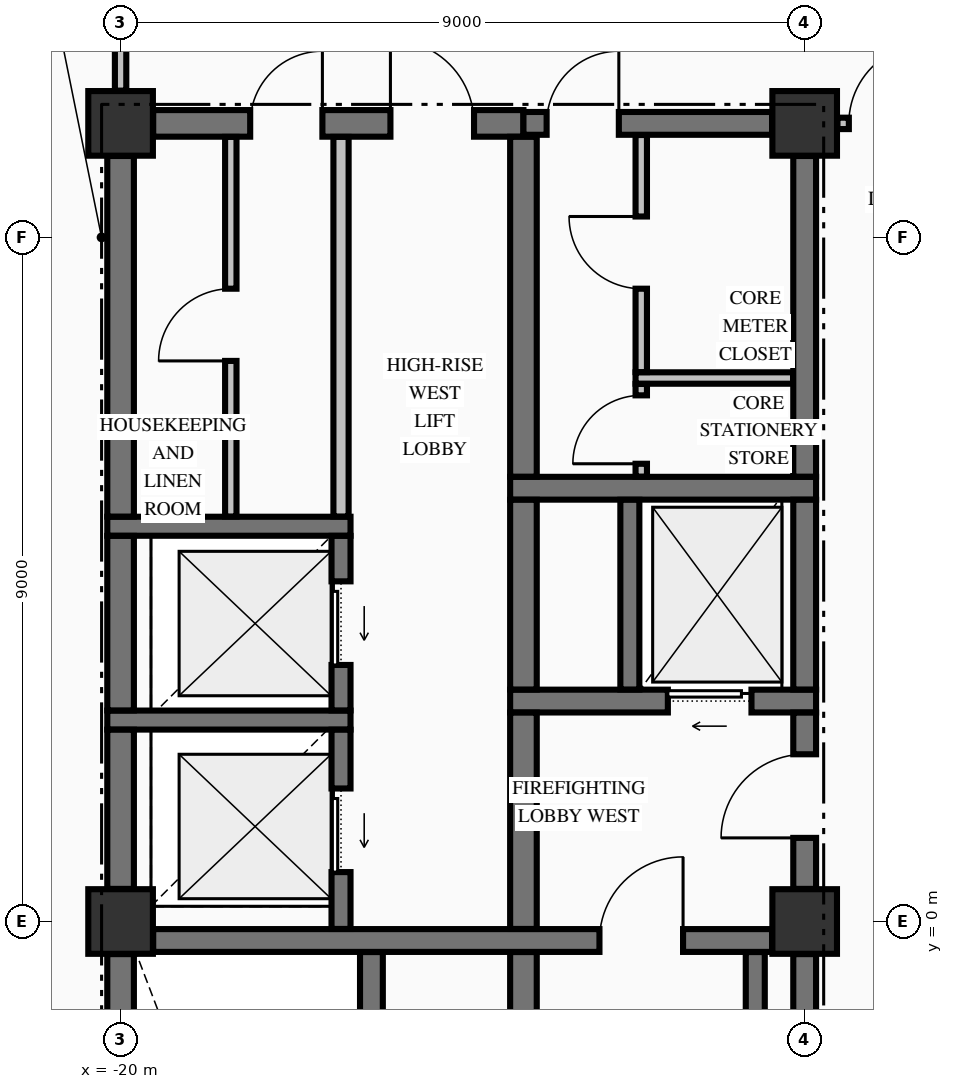
"""IFC4 building model, lengths in metres.
Left out: names, types, materials, properties, quantities, classifications, styles, units other than length and angle.
Written with IfcOpenShell. Run it as: python <this file> out.ifc"""

import sys

from ifc_helpers import new_model, si_unit, direction, frame, frame_2d, origin, origin_2d, place, context, subcontext, project, spatial, rectangle, extrude, element, fill, save


model = new_model("IFC4")
c1 = context("Model", 3, precision=1e-05, world=origin(), true_north=direction((0.0, 1.0)))
c2 = subcontext(c1, "Body", "Model", "MODEL_VIEW")
j1 = project(units=[si_unit("LENGTHUNIT", "METRE"), si_unit("PLANEANGLEUNIT", "RADIAN")], contexts=[c1])
p1 = place(None, origin())
s1 = spatial("IfcSite", under=j1, at=p1, CompositionType="ELEMENT")
p2 = place(p1, origin())
s2 = spatial("IfcBuilding", under=s1, at=p2, CompositionType="ELEMENT")
p3 = place(p2, frame((0.0, 0.0, 176.26)))
s3 = spatial("IfcBuildingStorey", under=s2, at=p3, CompositionType="ELEMENT", Elevation=176.26)
for number, where, z_axis, x_axis in (
    (1, (-20.0, 10.5, -0.275), (0.0, 0.0, 1.0), (1.0, 0.0, 0.0)),
    (2, (-11.0, 0.0, -0.275), (0.0, 0.0, 1.0), (1.0, 0.0, 0.0)),
    (3, (-11.0, 10.5, -0.275), (0.0, 0.0, 1.0), (1.0, 0.0, 0.0)),
    (4, (-20.0, 0.0, -0.275), (0.0, 0.0, 1.0), (1.0, 0.0, 0.0)),
):
    element("IfcColumn", number, at=place(p3, frame(where, z_axis=z_axis, x_axis=x_axis)), inside=s3, PredefinedType="COLUMN", context=c2, shape_type="SweptSolid", body=[
        extrude(rectangle(XDim=0.85, YDim=0.85, at=origin_2d()), origin(), (0.0, 0.0, 1.0), 3.425),
    ])
p4 = place(p3, frame((-19.571, -0.25, 0.0), z_axis=(0.0, 0.0, 1.0), x_axis=(1.0, 0.0, 0.0)))
e5 = element("IfcWall", 5, at=p4, inside=s3, PredefinedType="SHEAR", context=c2, shape_type="SweptSolid", body=[
    extrude(rectangle(XDim=8.142, YDim=0.3, at=frame_2d((4.071, 0.0))), origin(), (0.0, 0.0, 1.0), 3.15),
])
p5 = place(p4, frame((5.871, 0.0, 0.0)))
e6 = element("IfcOpeningElement", 6, at=p5, cuts=e5, PredefinedType="OPENING", context=c2, shape_type="SweptSolid", body=[
    extrude(rectangle(XDim=1.1, YDim=2.15, at=frame_2d((0.55, 1.075))), frame((0.0, 0.16, 0.0), z_axis=(0.0, -1.0, 0.0), x_axis=(1.0, 0.0, 0.0)), (0.0, 0.0, 1.0), 0.32),
])
p6 = place(p3, frame((-20.175, 2.65, 0.0), z_axis=(0.0, 0.0, 1.0), x_axis=(1.0, 0.0, 0.0)))
e7 = element("IfcWall", 7, at=p6, inside=s3, PredefinedType="SOLIDWALL", context=c2, shape_type="SweptSolid", body=[
    extrude(rectangle(XDim=3.2, YDim=0.25, at=frame_2d((1.6, 0.0))), origin(), (0.0, 0.0, 1.0), 3.15),
])
p7 = place(p3, frame((-14.875, 2.9, 0.0), z_axis=(0.0, 0.0, 1.0), x_axis=(1.0, 0.0, 0.0)))
e8 = element("IfcWall", 8, at=p7, inside=s3, PredefinedType="SHEAR", context=c2, shape_type="SweptSolid", body=[
    extrude(rectangle(XDim=4.025, YDim=0.3, at=frame_2d((2.012, 0.0))), origin(), (0.0, 0.0, 1.0), 3.15),
])
p8 = place(p7, frame((2.075, 0.0, 0.0)))
e9 = element("IfcOpeningElement", 9, at=p8, cuts=e8, PredefinedType="OPENING", context=c2, shape_type="SweptSolid", body=[
    extrude(rectangle(XDim=1.1, YDim=2.2, at=frame_2d((0.55, 1.1))), frame((0.0, 0.16, 0.0), z_axis=(0.0, -1.0, 0.0), x_axis=(1.0, 0.0, 0.0)), (0.0, 0.0, 1.0), 0.32),
])
p9 = place(p3, frame((-20.175, 5.2, 0.0), z_axis=(0.0, 0.0, 1.0), x_axis=(1.0, 0.0, 0.0)))
e10 = element("IfcWall", 10, at=p9, inside=s3, PredefinedType="SOLIDWALL", context=c2, shape_type="SweptSolid", body=[
    extrude(rectangle(XDim=3.2, YDim=0.25, at=frame_2d((1.6, 0.0))), origin(), (0.0, 0.0, 1.0), 3.15),
])
p10 = place(p3, frame((-14.875, 5.7, 0.0), z_axis=(0.0, 0.0, 1.0), x_axis=(1.0, 0.0, 0.0)))
e11 = element("IfcWall", 11, at=p10, inside=s3, PredefinedType="SHEAR", context=c2, shape_type="SweptSolid", body=[
    extrude(rectangle(XDim=4.025, YDim=0.3, at=frame_2d((2.012, 0.0))), origin(), (0.0, 0.0, 1.0), 3.15),
])
p11 = place(p3, frame((-19.571, 10.5, 0.0), z_axis=(0.0, 0.0, 1.0), x_axis=(1.0, 0.0, 0.0)))
e12 = element("IfcWall", 12, at=p11, inside=s3, PredefinedType="SHEAR", context=c2, shape_type="SweptSolid", body=[
    extrude(rectangle(XDim=4.871, YDim=0.35, at=frame_2d((2.436, 0.0))), origin(), (0.0, 0.0, 1.0), 3.15),
])
p12 = place(p11, frame((3.121, 0.0, 0.0)))
e13 = element("IfcOpeningElement", 13, at=p12, cuts=e12, PredefinedType="OPENING", context=c2, shape_type="SweptSolid", body=[
    extrude(rectangle(XDim=1.1, YDim=2.15, at=frame_2d((0.55, 1.075))), frame((0.0, 0.185, 0.0), z_axis=(0.0, -1.0, 0.0), x_axis=(1.0, 0.0, 0.0)), (0.0, 0.0, 1.0), 0.37),
])
p13 = place(p11, frame((1.276, 0.0, 0.0)))
e14 = element("IfcOpeningElement", 14, at=p13, cuts=e12, PredefinedType="OPENING", context=c2, shape_type="SweptSolid", body=[
    extrude(rectangle(XDim=0.95, YDim=2.15, at=frame_2d((0.475, 1.075))), frame((0.0, 0.185, 0.0), z_axis=(0.0, -1.0, 0.0), x_axis=(1.0, 0.0, 0.0)), (0.0, 0.0, 1.0), 0.37),
])
p14 = place(p3, frame((-14.7, 10.5, 0.0), z_axis=(0.0, 0.0, 1.0), x_axis=(1.0, 0.0, 0.0)))
e15 = element("IfcWall", 15, at=p14, inside=s3, PredefinedType="SHEAR", context=c2, shape_type="SweptSolid", body=[
    extrude(rectangle(XDim=3.271, YDim=0.3, at=frame_2d((1.635, 0.0))), origin(), (0.0, 0.0, 1.0), 3.15),
])
p15 = place(p14, frame((0.305, 0.0, 0.0)))
e16 = element("IfcOpeningElement", 16, at=p15, cuts=e15, PredefinedType="OPENING", context=c2, shape_type="SweptSolid", body=[
    extrude(rectangle(XDim=0.95, YDim=2.15, at=frame_2d((0.475, 1.075))), frame((0.0, 0.16, 0.0), z_axis=(0.0, -1.0, 0.0), x_axis=(1.0, 0.0, 0.0)), (0.0, 0.0, 1.0), 0.32),
])
p16 = place(p3, frame((-13.225, 7.15, 0.0), z_axis=(0.0, 0.0, 1.0), x_axis=(1.0, 0.0, 0.0)))
e17 = element("IfcWall", 17, at=p16, inside=s3, PredefinedType="PARTITIONING", context=c2, shape_type="SweptSolid", body=[
    extrude(rectangle(XDim=2.072, YDim=0.15, at=frame_2d((1.036, 0.0))), origin(), (0.0, 0.0, 1.0), 3.15),
])
p17 = place(p3, frame((-10.569, 10.5, 0.0), z_axis=(0.0, 0.0, 1.0), x_axis=(1.0, 0.0, 0.0)))
e18 = element("IfcWall", 18, at=p17, inside=s3, PredefinedType="PARTITIONING", context=c2, shape_type="SweptSolid", body=[
    extrude(rectangle(XDim=21.138, YDim=0.15, at=frame_2d((10.569, 0.0))), origin(), (0.0, 0.0, 1.0), 3.15),
])
p18 = place(p17, frame((0.15, 0.0, 0.0)))
e19 = element("IfcOpeningElement", 19, at=p18, cuts=e18, PredefinedType="OPENING", context=c2, shape_type="SweptSolid", body=[
    extrude(rectangle(XDim=1.05, YDim=2.15, at=frame_2d((0.525, 1.075))), frame((0.0, 0.085, 0.0), z_axis=(0.0, -1.0, 0.0), x_axis=(1.0, 0.0, 0.0)), (0.0, 0.0, 1.0), 0.17),
])
p19 = place(p17, frame((19.938, 0.0, 0.0)))
e20 = element("IfcOpeningElement", 20, at=p19, cuts=e18, PredefinedType="OPENING", context=c2, shape_type="SweptSolid", body=[
    extrude(rectangle(XDim=1.05, YDim=2.15, at=frame_2d((0.525, 1.075))), frame((0.0, 0.085, 0.0), z_axis=(0.0, -1.0, 0.0), x_axis=(1.0, 0.0, 0.0)), (0.0, 0.0, 1.0), 0.17),
])
p20 = place(p3, frame((-20.0, -9.521, 0.0), z_axis=(0.0, 0.0, 1.0), x_axis=(0.0, 1.0, 0.0)))
e21 = element("IfcWall", 21, at=p20, inside=s3, PredefinedType="SHEAR", context=c2, shape_type="SweptSolid", body=[
    extrude(rectangle(XDim=9.092, YDim=0.35, at=frame_2d((4.546, 0.0))), origin(), (0.0, 0.0, 1.0), 3.15),
])
p21 = place(p3, frame((-20.0, 0.429, 0.0), z_axis=(0.0, 0.0, 1.0), x_axis=(0.0, 1.0, 0.0)))
e22 = element("IfcWall", 22, at=p21, inside=s3, PredefinedType="SHEAR", context=c2, shape_type="SweptSolid", body=[
    extrude(rectangle(XDim=2.094, YDim=0.35, at=frame_2d((1.047, 0.0))), origin(), (0.0, 0.0, 1.0), 3.15),
])
p22 = place(p3, frame((-20.0, 2.777, 0.0), z_axis=(0.0, 0.0, 1.0), x_axis=(0.0, 1.0, 0.0)))
e23 = element("IfcWall", 23, at=p22, inside=s3, PredefinedType="SHEAR", context=c2, shape_type="SweptSolid", body=[
    extrude(rectangle(XDim=2.296, YDim=0.35, at=frame_2d((1.148, 0.0))), origin(), (0.0, 0.0, 1.0), 3.15),
])
p23 = place(p3, frame((-20.0, 5.327, 0.0), z_axis=(0.0, 0.0, 1.0), x_axis=(0.0, 1.0, 0.0)))
e24 = element("IfcWall", 24, at=p23, inside=s3, PredefinedType="SHEAR", context=c2, shape_type="SweptSolid", body=[
    extrude(rectangle(XDim=4.744, YDim=0.35, at=frame_2d((2.372, 0.0))), origin(), (0.0, 0.0, 1.0), 3.15),
])
p24 = place(p3, frame((-17.1, -0.098, 0.0), z_axis=(0.0, 0.0, 1.0), x_axis=(0.0, 1.0, 0.0)))
e25 = element("IfcWall", 25, at=p24, inside=s3, PredefinedType="SOLIDWALL", context=c2, shape_type="SweptSolid", body=[
    extrude(rectangle(XDim=2.621, YDim=0.25, at=frame_2d((1.311, 0.0))), origin(), (0.0, 0.0, 1.0), 3.15),
])
p25 = place(p24, frame((0.748, 0.0, 0.0)))
e26 = element("IfcOpeningElement", 26, at=p25, cuts=e25, PredefinedType="OPENING", context=c2, shape_type="SweptSolid", body=[
    extrude(rectangle(XDim=1.1, YDim=2.2, at=frame_2d((0.55, 1.1))), frame((0.0, 0.135, 0.0), z_axis=(0.0, -1.0, 0.0), x_axis=(1.0, 0.0, 0.0)), (0.0, 0.0, 1.0), 0.27),
])
p26 = place(p3, frame((-17.1, 2.777, 0.0), z_axis=(0.0, 0.0, 1.0), x_axis=(0.0, 1.0, 0.0)))
e27 = element("IfcWall", 27, at=p26, inside=s3, PredefinedType="SOLIDWALL", context=c2, shape_type="SweptSolid", body=[
    extrude(rectangle(XDim=2.296, YDim=0.25, at=frame_2d((1.148, 0.0))), origin(), (0.0, 0.0, 1.0), 3.15),
])
p27 = place(p26, frame((0.598, 0.0, 0.0)))
e28 = element("IfcOpeningElement", 28, at=p27, cuts=e27, PredefinedType="OPENING", context=c2, shape_type="SweptSolid", body=[
    extrude(rectangle(XDim=1.1, YDim=2.2, at=frame_2d((0.55, 1.1))), frame((0.0, 0.135, 0.0), z_axis=(0.0, -1.0, 0.0), x_axis=(1.0, 0.0, 0.0)), (0.0, 0.0, 1.0), 0.27),
])
p28 = place(p3, frame((-16.7, -9.773, 0.0), z_axis=(0.0, 0.0, 1.0), x_axis=(0.0, 1.0, 0.0)))
e29 = element("IfcWall", 29, at=p28, inside=s3, PredefinedType="SHEAR", context=c2, shape_type="SweptSolid", body=[
    extrude(rectangle(XDim=9.371, YDim=0.3, at=frame_2d((4.686, 0.0))), origin(), (0.0, 0.0, 1.0), 3.15),
])
p29 = place(p3, frame((-14.7, -9.773, 0.0), z_axis=(0.0, 0.0, 1.0), x_axis=(0.0, 1.0, 0.0)))
e30 = element("IfcWall", 30, at=p29, inside=s3, PredefinedType="SHEAR", context=c2, shape_type="SweptSolid", body=[
    extrude(rectangle(XDim=9.371, YDim=0.35, at=frame_2d((4.686, 0.0))), origin(), (0.0, 0.0, 1.0), 3.15),
])
p30 = place(p3, frame((-14.7, -0.098, 0.0), z_axis=(0.0, 0.0, 1.0), x_axis=(0.0, 1.0, 0.0)))
e31 = element("IfcWall", 31, at=p30, inside=s3, PredefinedType="SHEAR", context=c2, shape_type="SweptSolid", body=[
    extrude(rectangle(XDim=2.846, YDim=0.35, at=frame_2d((1.423, 0.0))), origin(), (0.0, 0.0, 1.0), 3.15),
])
p31 = place(p3, frame((-14.7, 3.052, 0.0), z_axis=(0.0, 0.0, 1.0), x_axis=(0.0, 1.0, 0.0)))
e32 = element("IfcWall", 32, at=p31, inside=s3, PredefinedType="SHEAR", context=c2, shape_type="SweptSolid", body=[
    extrude(rectangle(XDim=2.496, YDim=0.35, at=frame_2d((1.248, 0.0))), origin(), (0.0, 0.0, 1.0), 3.15),
])
p32 = place(p3, frame((-14.7, 5.852, 0.0), z_axis=(0.0, 0.0, 1.0), x_axis=(0.0, 1.0, 0.0)))
e33 = element("IfcWall", 33, at=p32, inside=s3, PredefinedType="SHEAR", context=c2, shape_type="SweptSolid", body=[
    extrude(rectangle(XDim=4.471, YDim=0.35, at=frame_2d((2.235, 0.0))), origin(), (0.0, 0.0, 1.0), 3.15),
])
p33 = place(p3, frame((-13.3, 3.052, 0.0), z_axis=(0.0, 0.0, 1.0), x_axis=(0.0, 1.0, 0.0)))
e34 = element("IfcWall", 34, at=p33, inside=s3, PredefinedType="SOLIDWALL", context=c2, shape_type="SweptSolid", body=[
    extrude(rectangle(XDim=2.496, YDim=0.25, at=frame_2d((1.248, 0.0))), origin(), (0.0, 0.0, 1.0), 3.15),
])
p34 = place(p3, frame((-11.65, -9.798, 0.0), z_axis=(0.0, 0.0, 1.0), x_axis=(0.0, 1.0, 0.0)))
e35 = element("IfcWall", 35, at=p34, inside=s3, PredefinedType="SOLIDWALL", context=c2, shape_type="SweptSolid", body=[
    extrude(rectangle(XDim=9.396, YDim=0.25, at=frame_2d((4.698, 0.0))), origin(), (0.0, 0.0, 1.0), 3.15),
])
p35 = place(p3, frame((-11.0, -9.521, 0.0), z_axis=(0.0, 0.0, 1.0), x_axis=(0.0, 1.0, 0.0)))
e36 = element("IfcWall", 36, at=p35, inside=s3, PredefinedType="SHEAR", context=c2, shape_type="SweptSolid", body=[
    extrude(rectangle(XDim=9.092, YDim=0.3, at=frame_2d((4.546, 0.0))), origin(), (0.0, 0.0, 1.0), 3.15),
])
p36 = place(p3, frame((-11.0, 0.429, 0.0), z_axis=(0.0, 0.0, 1.0), x_axis=(0.0, 1.0, 0.0)))
e37 = element("IfcWall", 37, at=p36, inside=s3, PredefinedType="SHEAR", context=c2, shape_type="SweptSolid", body=[
    extrude(rectangle(XDim=2.319, YDim=0.3, at=frame_2d((1.16, 0.0))), origin(), (0.0, 0.0, 1.0), 3.15),
])
p37 = place(p36, frame((0.671, 0.0, 0.0)))
e38 = element("IfcOpeningElement", 38, at=p37, cuts=e37, PredefinedType="OPENING", context=c2, shape_type="SweptSolid", body=[
    extrude(rectangle(XDim=1.1, YDim=2.15, at=frame_2d((0.55, 1.075))), frame((0.0, 0.16, 0.0), z_axis=(0.0, -1.0, 0.0), x_axis=(1.0, 0.0, 0.0)), (0.0, 0.0, 1.0), 0.32),
])
p38 = place(p3, frame((-11.0, 3.052, 0.0), z_axis=(0.0, 0.0, 1.0), x_axis=(0.0, 1.0, 0.0)))
e39 = element("IfcWall", 39, at=p38, inside=s3, PredefinedType="SHEAR", context=c2, shape_type="SweptSolid", body=[
    extrude(rectangle(XDim=2.496, YDim=0.3, at=frame_2d((1.248, 0.0))), origin(), (0.0, 0.0, 1.0), 3.15),
])
p39 = place(p3, frame((-11.0, 5.852, 0.0), z_axis=(0.0, 0.0, 1.0), x_axis=(0.0, 1.0, 0.0)))
e40 = element("IfcWall", 40, at=p39, inside=s3, PredefinedType="SHEAR", context=c2, shape_type="SweptSolid", body=[
    extrude(rectangle(XDim=4.219, YDim=0.3, at=frame_2d((2.109, 0.0))), origin(), (0.0, 0.0, 1.0), 3.15),
])
p40 = place(p3, frame((-20.0, 10.931, 0.0), z_axis=(0.0, 0.0, 1.0), x_axis=(0.0, 1.0, 0.0)))
e41 = element("IfcWall", 41, at=p40, inside=s3, PredefinedType="PARTITIONING", context=c2, shape_type="SweptSolid", body=[
    extrude(rectangle(XDim=2.341, YDim=0.15, at=frame_2d((1.17, 0.0))), origin(), (0.0, 0.0, 1.0), 2.342),
])
p41 = place(p3, frame((-18.55, 5.328, 0.0), z_axis=(0.0, 0.0, 1.0), x_axis=(0.0, 1.0, 0.0)))
e42 = element("IfcWall", 42, at=p41, inside=s3, PredefinedType="PARTITIONING", context=c2, shape_type="SweptSolid", body=[
    extrude(rectangle(XDim=4.994, YDim=0.15, at=frame_2d((2.497, 0.0))), origin(), (0.0, 0.0, 1.0), 3.15),
])
p42 = place(p41, frame((2.047, 0.0, 0.0)))
e43 = element("IfcOpeningElement", 43, at=p42, cuts=e42, PredefinedType="OPENING", context=c2, shape_type="SweptSolid", body=[
    extrude(rectangle(XDim=0.95, YDim=2.15, at=frame_2d((0.475, 1.075))), frame((0.0, 0.085, 0.0), z_axis=(0.0, -1.0, 0.0), x_axis=(1.0, 0.0, 0.0)), (0.0, 0.0, 1.0), 0.17),
])
p43 = place(p3, frame((-17.1, 5.328, 0.0), z_axis=(0.0, 0.0, 1.0), x_axis=(0.0, 1.0, 0.0)))
e44 = element("IfcWall", 44, at=p43, inside=s3, PredefinedType="PARTITIONING", context=c2, shape_type="SweptSolid", body=[
    extrude(rectangle(XDim=4.994, YDim=0.2, at=frame_2d((2.497, 0.0))), origin(), (0.0, 0.0, 1.0), 3.15),
])
p44 = place(p3, frame((-13.15, 5.853, 0.0), z_axis=(0.0, 0.0, 1.0), x_axis=(0.0, 1.0, 0.0)))
e45 = element("IfcWall", 45, at=p44, inside=s3, PredefinedType="PARTITIONING", context=c2, shape_type="SweptSolid", body=[
    extrude(rectangle(XDim=1.219, YDim=0.15, at=frame_2d((0.609, 0.0))), origin(), (0.0, 0.0, 1.0), 3.15),
])
p45 = place(p44, frame((0.169, 0.0, 0.0)))
e46 = element("IfcOpeningElement", 46, at=p45, cuts=e45, PredefinedType="OPENING", context=c2, shape_type="SweptSolid", body=[
    extrude(rectangle(XDim=0.9, YDim=2.15, at=frame_2d((0.45, 1.075))), frame((0.0, 0.085, 0.0), z_axis=(0.0, -1.0, 0.0), x_axis=(1.0, 0.0, 0.0)), (0.0, 0.0, 1.0), 0.17),
])
p46 = place(p3, frame((-13.15, 7.228, 0.0), z_axis=(0.0, 0.0, 1.0), x_axis=(0.0, 1.0, 0.0)))
e47 = element("IfcWall", 47, at=p46, inside=s3, PredefinedType="PARTITIONING", context=c2, shape_type="SweptSolid", body=[
    extrude(rectangle(XDim=3.119, YDim=0.15, at=frame_2d((1.56, 0.0))), origin(), (0.0, 0.0, 1.0), 3.15),
])
p47 = place(p46, frame((1.097, 0.0, 0.0)))
e48 = element("IfcOpeningElement", 48, at=p47, cuts=e47, PredefinedType="OPENING", context=c2, shape_type="SweptSolid", body=[
    extrude(rectangle(XDim=0.95, YDim=2.15, at=frame_2d((0.475, 1.075))), frame((0.0, 0.085, 0.0), z_axis=(0.0, -1.0, 0.0), x_axis=(1.0, 0.0, 0.0)), (0.0, 0.0, 1.0), 0.17),
])
p48 = place(p5, origin())
e49 = element("IfcDoor", 49, at=p48, inside=s3, OperationType="SINGLE_SWING_RIGHT", PredefinedType="DOOR", context=c2, shape_type="SweptSolid", body=[
    extrude(rectangle(XDim=1.1, YDim=2.15, at=frame_2d((0.55, 1.075))), frame((0.0, 0.025, 0.0), z_axis=(0.0, -1.0, 0.0), x_axis=(1.0, 0.0, 0.0)), (0.0, 0.0, 1.0), 0.05),
])
fill(e6, e49)
p49 = place(p37, origin())
e50 = element("IfcDoor", 50, at=p49, inside=s3, OperationType="SINGLE_SWING_LEFT", PredefinedType="DOOR", context=c2, shape_type="SweptSolid", body=[
    extrude(rectangle(XDim=1.1, YDim=2.15, at=frame_2d((0.55, 1.075))), frame((0.0, 0.025, 0.0), z_axis=(0.0, -1.0, 0.0), x_axis=(1.0, 0.0, 0.0)), (0.0, 0.0, 1.0), 0.05),
])
fill(e38, e50)
p50 = place(p8, origin())
e51 = element("IfcDoor", 51, at=p50, inside=s3, OperationType="SLIDING_TO_LEFT", PredefinedType="DOOR", context=c2, shape_type="SweptSolid", body=[
    extrude(rectangle(XDim=1.1, YDim=2.2, at=frame_2d((0.55, 1.1))), frame((0.0, 0.025, 0.0), z_axis=(0.0, -1.0, 0.0), x_axis=(1.0, 0.0, 0.0)), (0.0, 0.0, 1.0), 0.05),
])
fill(e9, e51)
p51 = place(p15, origin())
e52 = element("IfcDoor", 52, at=p51, inside=s3, OperationType="SINGLE_SWING_RIGHT", PredefinedType="DOOR", context=c2, shape_type="SweptSolid", body=[
    extrude(rectangle(XDim=0.95, YDim=2.15, at=frame_2d((0.475, 1.075))), frame((0.0, 0.025, 0.0), z_axis=(0.0, -1.0, 0.0), x_axis=(1.0, 0.0, 0.0)), (0.0, 0.0, 1.0), 0.05),
])
fill(e16, e52)
p52 = place(p45, origin())
e53 = element("IfcDoor", 53, at=p52, inside=s3, OperationType="SINGLE_SWING_LEFT", PredefinedType="DOOR", context=c2, shape_type="SweptSolid", body=[
    extrude(rectangle(XDim=0.9, YDim=2.15, at=frame_2d((0.45, 1.075))), frame((0.0, 0.025, 0.0), z_axis=(0.0, -1.0, 0.0), x_axis=(1.0, 0.0, 0.0)), (0.0, 0.0, 1.0), 0.05),
])
fill(e46, e53)
p53 = place(p47, origin())
e54 = element("IfcDoor", 54, at=p53, inside=s3, OperationType="SINGLE_SWING_RIGHT", PredefinedType="DOOR", context=c2, shape_type="SweptSolid", body=[
    extrude(rectangle(XDim=0.95, YDim=2.15, at=frame_2d((0.475, 1.075))), frame((0.0, 0.025, 0.0), z_axis=(0.0, -1.0, 0.0), x_axis=(1.0, 0.0, 0.0)), (0.0, 0.0, 1.0), 0.05),
])
fill(e48, e54)
p54 = place(p25, origin())
e55 = element("IfcDoor", 55, at=p54, inside=s3, OperationType="SLIDING_TO_LEFT", PredefinedType="DOOR", context=c2, shape_type="SweptSolid", body=[
    extrude(rectangle(XDim=1.1, YDim=2.2, at=frame_2d((0.55, 1.1))), frame((0.0, 0.025, 0.0), z_axis=(0.0, -1.0, 0.0), x_axis=(1.0, 0.0, 0.0)), (0.0, 0.0, 1.0), 0.05),
])
fill(e26, e55)
p55 = place(p27, origin())
e56 = element("IfcDoor", 56, at=p55, inside=s3, OperationType="SLIDING_TO_LEFT", PredefinedType="DOOR", context=c2, shape_type="SweptSolid", body=[
    extrude(rectangle(XDim=1.1, YDim=2.2, at=frame_2d((0.55, 1.1))), frame((0.0, 0.025, 0.0), z_axis=(0.0, -1.0, 0.0), x_axis=(1.0, 0.0, 0.0)), (0.0, 0.0, 1.0), 0.05),
])
fill(e28, e56)
p56 = place(p12, origin())
e57 = element("IfcDoor", 57, at=p56, inside=s3, OperationType="SINGLE_SWING_LEFT", PredefinedType="DOOR", context=c2, shape_type="SweptSolid", body=[
    extrude(rectangle(XDim=1.1, YDim=2.15, at=frame_2d((0.55, 1.075))), frame((0.0, 0.025, 0.0), z_axis=(0.0, -1.0, 0.0), x_axis=(1.0, 0.0, 0.0)), (0.0, 0.0, 1.0), 0.05),
])
fill(e13, e57)
p57 = place(p13, origin())
e58 = element("IfcDoor", 58, at=p57, inside=s3, OperationType="SINGLE_SWING_RIGHT", PredefinedType="DOOR", context=c2, shape_type="SweptSolid", body=[
    extrude(rectangle(XDim=0.95, YDim=2.15, at=frame_2d((0.475, 1.075))), frame((0.0, 0.025, 0.0), z_axis=(0.0, -1.0, 0.0), x_axis=(1.0, 0.0, 0.0)), (0.0, 0.0, 1.0), 0.05),
])
fill(e14, e58)
p58 = place(p42, origin())
e59 = element("IfcDoor", 59, at=p58, inside=s3, OperationType="SINGLE_SWING_LEFT", PredefinedType="DOOR", context=c2, shape_type="SweptSolid", body=[
    extrude(rectangle(XDim=0.95, YDim=2.15, at=frame_2d((0.475, 1.075))), frame((0.0, 0.025, 0.0), z_axis=(0.0, -1.0, 0.0), x_axis=(1.0, 0.0, 0.0)), (0.0, 0.0, 1.0), 0.05),
])
fill(e43, e59)
p59 = place(p18, origin())
e60 = element("IfcDoor", 60, at=p59, inside=s3, OperationType="SINGLE_SWING_RIGHT", PredefinedType="DOOR", context=c2, shape_type="SweptSolid", body=[
    extrude(rectangle(XDim=1.05, YDim=2.15, at=frame_2d((0.525, 1.075))), frame((0.0, 0.025, 0.0), z_axis=(0.0, -1.0, 0.0), x_axis=(1.0, 0.0, 0.0)), (0.0, 0.0, 1.0), 0.05),
])
fill(e19, e60)
save(model, sys.argv[1])
